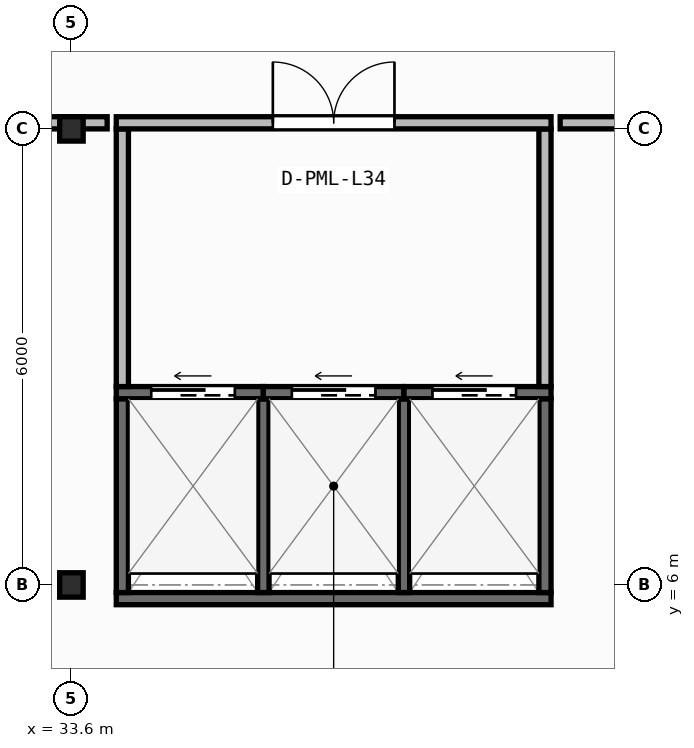
"""IFC4 building model, lengths in metres.
Left out: names, types, materials, properties, quantities, classifications, styles, units other than length and angle.
Written with IfcOpenShell. Run it as: python <this file> out.ifc"""

import sys

from ifc_helpers import new_model, si_unit, direction, frame, frame_2d, origin, origin_2d, place, context, subcontext, project, spatial, rectangle, i_section, extrude, element, fill, save


model = new_model("IFC4")
c1 = context("Model", 3, precision=1e-05, world=origin(), true_north=direction((0.0, 1.0)))
c2 = subcontext(c1, "Body", "Model", "MODEL_VIEW")
j1 = project(units=[si_unit("LENGTHUNIT", "METRE"), si_unit("PLANEANGLEUNIT", "RADIAN")], contexts=[c1])
p1 = place(None, origin())
s1 = spatial("IfcSite", under=j1, at=p1, CompositionType="ELEMENT")
p2 = place(p1, origin())
s2 = spatial("IfcBuilding", under=s1, at=p2, CompositionType="ELEMENT")
p3 = place(p2, frame((0.0, 0.0, 138.9)))
s3 = spatial("IfcBuildingStorey", under=s2, at=p3, CompositionType="ELEMENT", Elevation=138.9)
for number, where, z_axis, x_axis in (
    (1, (33.6, 6.0, 0.0), (0.0, 0.0, 1.0), (1.0, 0.0, 0.0)),
    (2, (33.6, 12.0, 0.0), (0.0, 0.0, 1.0), (1.0, 0.0, 0.0)),
):
    element("IfcColumn", number, at=place(p3, frame(where, z_axis=z_axis, x_axis=x_axis)), inside=s3, PredefinedType="COLUMN", context=c2, shape_type="SweptSolid", body=[
        extrude(i_section(OverallWidth=0.309, OverallDepth=0.321, WebThickness=0.014, FlangeThickness=0.022, FilletRadius=0.017, at=origin_2d()), origin(), (0.0, 0.0, 1.0), 3.95),
    ])
p4 = place(p3, frame((34.19, 5.82, 0.0), z_axis=(0.0, 0.0, 1.0), x_axis=(1.0, 0.0, 0.0)))
e3 = element("IfcWall", 3, at=p4, inside=s3, PredefinedType="SHEAR", context=c2, shape_type="SweptSolid", body=[
    extrude(rectangle(XDim=5.72, YDim=0.16, at=frame_2d((2.86, 0.0))), origin(), (0.0, 0.0, 1.0), 3.71),
])
for number, where, z_axis, x_axis in (
    (4, (34.27, 5.9, 0.0), (0.0, 0.0, 1.0), (0.0, 1.0, 0.0)),
    (5, (39.83, 5.9, 0.0), (0.0, 0.0, 1.0), (0.0, 1.0, 0.0)),
):
    element("IfcWall", number, at=place(p3, frame(where, z_axis=z_axis, x_axis=x_axis)), inside=s3, PredefinedType="SHEAR", context=c2, shape_type="SweptSolid", body=[
        extrude(rectangle(XDim=2.55, YDim=0.16, at=frame_2d((1.275, 0.0))), origin(), (0.0, 0.0, 1.0), 3.71),
    ])
for number, where, z_axis, x_axis in (
    (6, (36.125, 5.9, 0.0), (0.0, 0.0, 1.0), (0.0, 1.0, 0.0)),
    (7, (37.975, 5.9, 0.0), (0.0, 0.0, 1.0), (0.0, 1.0, 0.0)),
):
    element("IfcWall", number, at=place(p3, frame(where, z_axis=z_axis, x_axis=x_axis)), inside=s3, PredefinedType="SHEAR", context=c2, shape_type="SweptSolid", body=[
        extrude(rectangle(XDim=2.55, YDim=0.15, at=frame_2d((1.275, 0.0))), origin(), (0.0, 0.0, 1.0), 3.71),
    ])
p5 = place(p3, frame((34.19, 8.53, 0.0), z_axis=(0.0, 0.0, 1.0), x_axis=(1.0, 0.0, 0.0)))
e8 = element("IfcWall", 8, at=p5, inside=s3, PredefinedType="SHEAR", context=c2, shape_type="SweptSolid", body=[
    extrude(rectangle(XDim=1.935, YDim=0.16, at=frame_2d((0.968, 0.0))), origin(), (0.0, 0.0, 1.0), 3.71),
])
p6 = place(p5, frame((0.46, 0.0, 0.0)))
e9 = element("IfcOpeningElement", 9, at=p6, cuts=e8, PredefinedType="OPENING", context=c2, shape_type="SweptSolid", body=[
    extrude(rectangle(XDim=1.1, YDim=2.15, at=frame_2d((0.55, 1.075))), frame((0.0, 0.09, 0.0), z_axis=(0.0, -1.0, 0.0), x_axis=(1.0, 0.0, 0.0)), (0.0, 0.0, 1.0), 0.18),
])
p7 = place(p3, frame((36.125, 8.53, 0.0), z_axis=(0.0, 0.0, 1.0), x_axis=(1.0, 0.0, 0.0)))
e10 = element("IfcWall", 10, at=p7, inside=s3, PredefinedType="SHEAR", context=c2, shape_type="SweptSolid", body=[
    extrude(rectangle(XDim=1.85, YDim=0.16, at=frame_2d((0.925, 0.0))), origin(), (0.0, 0.0, 1.0), 3.71),
])
p8 = place(p7, frame((0.375, 0.0, 0.0)))
e11 = element("IfcOpeningElement", 11, at=p8, cuts=e10, PredefinedType="OPENING", context=c2, shape_type="SweptSolid", body=[
    extrude(rectangle(XDim=1.1, YDim=2.15, at=frame_2d((0.55, 1.075))), frame((0.0, 0.09, 0.0), z_axis=(0.0, -1.0, 0.0), x_axis=(1.0, 0.0, 0.0)), (0.0, 0.0, 1.0), 0.18),
])
p9 = place(p3, frame((37.975, 8.53, 0.0), z_axis=(0.0, 0.0, 1.0), x_axis=(1.0, 0.0, 0.0)))
e12 = element("IfcWall", 12, at=p9, inside=s3, PredefinedType="SHEAR", context=c2, shape_type="SweptSolid", body=[
    extrude(rectangle(XDim=1.935, YDim=0.16, at=frame_2d((0.967, 0.0))), origin(), (0.0, 0.0, 1.0), 3.71),
])
p10 = place(p9, frame((0.375, 0.0, 0.0)))
e13 = element("IfcOpeningElement", 13, at=p10, cuts=e12, PredefinedType="OPENING", context=c2, shape_type="SweptSolid", body=[
    extrude(rectangle(XDim=1.1, YDim=2.15, at=frame_2d((0.55, 1.075))), frame((0.0, 0.09, 0.0), z_axis=(0.0, -1.0, 0.0), x_axis=(1.0, 0.0, 0.0)), (0.0, 0.0, 1.0), 0.18),
])
for number, where, z_axis, x_axis in (
    (14, (34.27, 8.61, 0.0), (0.0, 0.0, 1.0), (0.0, 1.0, 0.0)),
    (15, (39.83, 8.61, 0.0), (0.0, 0.0, 1.0), (0.0, 1.0, 0.0)),
):
    element("IfcWall", number, at=place(p3, frame(where, z_axis=z_axis, x_axis=x_axis)), inside=s3, PredefinedType="PARTITIONING", context=c2, shape_type="SweptSolid", body=[
        extrude(rectangle(XDim=3.39, YDim=0.16, at=frame_2d((1.695, 0.0))), origin(), (0.0, 0.0, 1.0), 3.71),
    ])
p11 = place(p3, frame((34.19, 12.08, 0.0), z_axis=(0.0, 0.0, 1.0), x_axis=(1.0, 0.0, 0.0)))
e16 = element("IfcWall", 16, at=p11, inside=s3, PredefinedType="PARTITIONING", context=c2, shape_type="SweptSolid", body=[
    extrude(rectangle(XDim=5.72, YDim=0.16, at=frame_2d((2.86, 0.0))), origin(), (0.0, 0.0, 1.0), 3.083),
])
p12 = place(p11, frame((2.06, 0.0, 0.0)))
e17 = element("IfcOpeningElement", 17, at=p12, cuts=e16, PredefinedType="OPENING", context=c2, shape_type="SweptSolid", body=[
    extrude(rectangle(XDim=1.6, YDim=2.05, at=frame_2d((0.8, 1.025))), frame((0.0, 0.09, 0.0), z_axis=(0.0, -1.0, 0.0), x_axis=(1.0, 0.0, 0.0)), (0.0, 0.0, 1.0), 0.18),
])
p13 = place(p3, frame((31.439, 12.08, 0.0), z_axis=(0.0, 0.0, 1.0), x_axis=(1.0, 0.0, 0.0)))
e18 = element("IfcWall", 18, at=p13, inside=s3, PredefinedType="PARTITIONING", context=c2, shape_type="SweptSolid", body=[
    extrude(rectangle(XDim=2.631, YDim=0.16, at=frame_2d((1.315, 0.0))), origin(), (0.0, 0.0, 1.0), 3.083),
])
p14 = place(p3, frame((40.03, 12.08, 0.0), z_axis=(0.0, 0.0, 1.0), x_axis=(1.0, 0.0, 0.0)))
e19 = element("IfcWall", 19, at=p14, inside=s3, PredefinedType="PARTITIONING", context=c2, shape_type="SweptSolid", body=[
    extrude(rectangle(XDim=2.781, YDim=0.16, at=frame_2d((1.39, 0.0))), origin(), (0.0, 0.0, 1.0), 3.083),
])
p15 = place(p6, origin())
e20 = element("IfcDoor", 20, at=p15, inside=s3, OperationType="SLIDING_TO_LEFT", PredefinedType="DOOR", context=c2, shape_type="SweptSolid", body=[
    extrude(rectangle(XDim=1.1, YDim=2.15, at=frame_2d((0.55, 1.075))), frame((0.0, 0.025, 0.0), z_axis=(0.0, -1.0, 0.0), x_axis=(1.0, 0.0, 0.0)), (0.0, 0.0, 1.0), 0.05),
])
fill(e9, e20)
p16 = place(p8, origin())
e21 = element("IfcDoor", 21, at=p16, inside=s3, OperationType="SLIDING_TO_LEFT", PredefinedType="DOOR", context=c2, shape_type="SweptSolid", body=[
    extrude(rectangle(XDim=1.1, YDim=2.15, at=frame_2d((0.55, 1.075))), frame((0.0, 0.025, 0.0), z_axis=(0.0, -1.0, 0.0), x_axis=(1.0, 0.0, 0.0)), (0.0, 0.0, 1.0), 0.05),
])
fill(e11, e21)
p17 = place(p10, origin())
e22 = element("IfcDoor", 22, at=p17, inside=s3, OperationType="SLIDING_TO_LEFT", PredefinedType="DOOR", context=c2, shape_type="SweptSolid", body=[
    extrude(rectangle(XDim=1.1, YDim=2.15, at=frame_2d((0.55, 1.075))), frame((0.0, 0.025, 0.0), z_axis=(0.0, -1.0, 0.0), x_axis=(1.0, 0.0, 0.0)), (0.0, 0.0, 1.0), 0.05),
])
fill(e13, e22)
p18 = place(p12, origin())
e23 = element("IfcDoor", 23, at=p18, inside=s3, OperationType="DOUBLE_DOOR_SINGLE_SWING", PredefinedType="DOOR", context=c2, shape_type="SweptSolid", body=[
    extrude(rectangle(XDim=1.6, YDim=2.05, at=frame_2d((0.8, 1.025))), frame((0.0, 0.025, 0.0), z_axis=(0.0, -1.0, 0.0), x_axis=(1.0, 0.0, 0.0)), (0.0, 0.0, 1.0), 0.05),
])
fill(e17, e23)
save(model, sys.argv[1])
